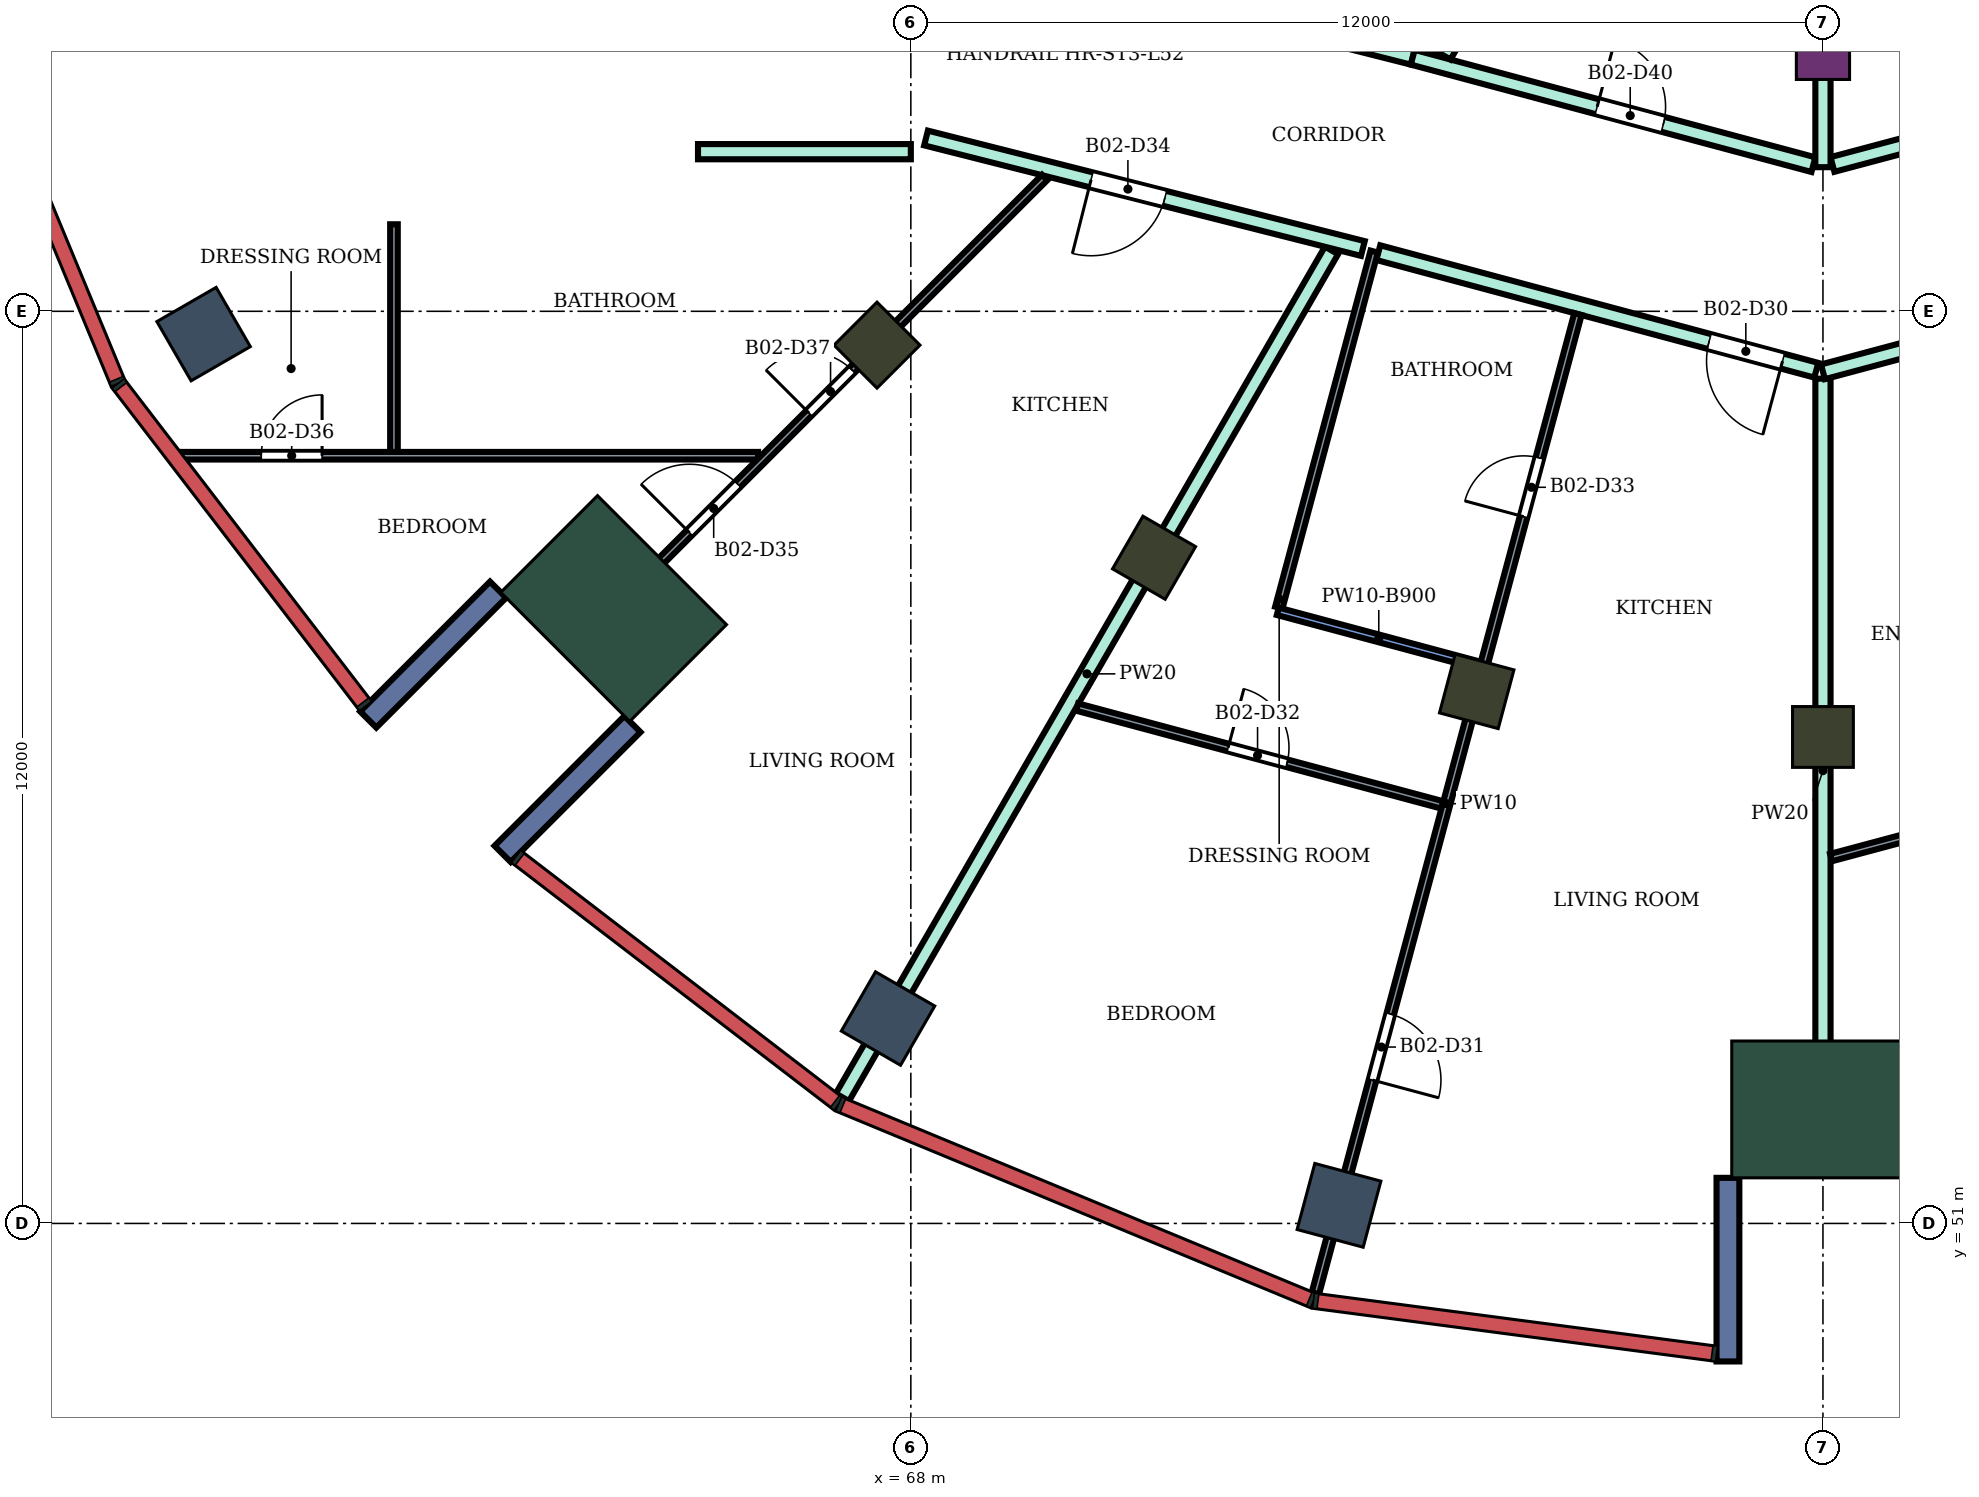
"""IFC4 building model, lengths in metres.
Left out: names, types, materials, properties, quantities, classifications, styles, units other than length and angle.
Written with IfcOpenShell. Run it as: python <this file> out.ifc"""

import sys

from ifc_helpers import new_model, si_unit, direction, frame, frame_2d, origin, origin_2d, place, context, subcontext, project, spatial, rectangle, extrude, element, fill, save


model = new_model("IFC4")
c1 = context("Model", 3, precision=1e-05, world=origin(), true_north=direction((0.0, 1.0)))
c2 = subcontext(c1, "Body", "Model", "MODEL_VIEW")
j1 = project(units=[si_unit("LENGTHUNIT", "METRE"), si_unit("PLANEANGLEUNIT", "RADIAN")], contexts=[c1])
p1 = place(None, origin())
s1 = spatial("IfcSite", under=j1, at=p1, CompositionType="ELEMENT")
p2 = place(p1, origin())
s2 = spatial("IfcBuilding", under=s1, at=p2, CompositionType="ELEMENT")
p3 = place(p2, frame((0.0, 0.0, 225.1)))
s3 = spatial("IfcBuildingStorey", under=s2, at=p3, CompositionType="ELEMENT", Elevation=225.1)
for number, where, z_axis, x_axis in (
    (1, (58.696, 62.7, 0.0), (0.0, 0.0, 1.0), (-0.866, -0.5, 0.0)),
    (2, (67.7, 53.696, 0.0), (0.0, 0.0, 1.0), (-0.5, -0.866, 0.0)),
    (3, (73.633, 51.238, 0.0), (0.0, 0.0, 1.0), (-0.259, -0.966, 0.0)),
):
    element("IfcColumn", number, at=place(p3, frame(where, z_axis=z_axis, x_axis=x_axis)), inside=s3, PredefinedType="COLUMN", context=c2, shape_type="SweptSolid", body=[
        extrude(rectangle(XDim=0.9, YDim=0.9, at=origin_2d()), origin(), (0.0, 0.0, 1.0), 4.2),
    ])
for number, where, z_axis, x_axis in (
    (4, (67.555, 62.555, 0.0), (0.0, 0.0, 1.0), (-0.707, -0.707, 0.0)),
    (5, (71.2, 59.758, 0.0), (0.0, 0.0, 1.0), (-0.5, -0.866, 0.0)),
    (6, (75.445, 58.0, 0.0), (0.0, 0.0, 1.0), (-0.259, -0.966, 0.0)),
    (7, (80.0, 57.4, 0.0), (0.0, 0.0, 1.0), (0.0, -1.0, 0.0)),
):
    element("IfcColumn", number, at=place(p3, frame(where, z_axis=z_axis, x_axis=x_axis)), inside=s3, PredefinedType="COLUMN", context=c2, shape_type="SweptSolid", body=[
        extrude(rectangle(XDim=0.8, YDim=0.8, at=origin_2d()), origin(), (0.0, 0.0, 1.0), 4.2),
    ])
p4 = place(p3, frame((80.0, 66.4, 0.0), z_axis=(0.0, 0.0, 1.0), x_axis=(0.0, -1.0, 0.0)))
e8 = element("IfcColumn", 8, at=p4, inside=s3, PredefinedType="COLUMN", context=c2, shape_type="SweptSolid", body=[
    extrude(rectangle(XDim=0.7, YDim=0.7, at=origin_2d()), origin(), (0.0, 0.0, 1.0), 4.2),
])
for number, where, z_axis, x_axis in (
    (9, (64.09, 59.09, 0.0), (0.0, 0.0, 1.0), (-0.707, -0.707, 0.0)),
    (10, (80.0, 52.5, 0.0), (0.0, 0.0, 1.0), (0.0, -1.0, 0.0)),
):
    element("IfcColumn", number, at=place(p3, frame(where, z_axis=z_axis, x_axis=x_axis)), inside=s3, PredefinedType="COLUMN", context=c2, shape_type="SweptSolid", body=[
        extrude(rectangle(XDim=1.8, YDim=2.4, at=origin_2d()), origin(), (0.0, 0.0, 1.0), 4.2),
    ])
for number, where, z_axis, x_axis in (
    (11, (62.57, 59.338, 0.0), (0.0, 0.0, 1.0), (-0.707, -0.707, 0.0)),
    (12, (64.338, 57.57, 0.0), (0.0, 0.0, 1.0), (-0.707, -0.707, 0.0)),
    (13, (78.75, 51.6, 0.0), (0.0, 0.0, 1.0), (0.0, -1.0, 0.0)),
):
    element("IfcWall", number, at=place(p3, frame(where, z_axis=z_axis, x_axis=x_axis)), inside=s3, PredefinedType="NOTDEFINED", context=c2, shape_type="SweptSolid", body=[
        extrude(rectangle(XDim=2.416, YDim=0.3, at=frame_2d((1.208, 0.0))), origin(), (0.0, 0.0, 1.0), 4.2),
    ])
p5 = place(p3, frame((65.2, 65.1, 0.0), z_axis=(0.0, 0.0, 1.0), x_axis=(1.0, 0.0, 0.0)))
e14 = element("IfcWall", 14, at=p5, inside=s3, PredefinedType="PARTITIONING", context=c2, shape_type="SweptSolid", body=[
    extrude(rectangle(XDim=2.8, YDim=0.2, at=frame_2d((1.4, 0.0))), origin(), (0.0, 0.0, 1.0), 3.75),
])
p6 = place(p3, frame((67.1, 52.659, 0.0), z_axis=(0.0, 0.0, 1.0), x_axis=(0.500128690501, 0.865951091539, 0.0)))
e15 = element("IfcWall", 15, at=p6, inside=s3, PredefinedType="PARTITIONING", context=c2, shape_type="SweptSolid", body=[
    extrude(rectangle(XDim=12.866, YDim=0.2, at=frame_2d((6.433, 0.0))), origin(), (0.0, 0.0, 1.0), 3.75),
])
p7 = place(p3, frame((68.2, 65.28, 0.0), z_axis=(0.0, 0.0, 1.0), x_axis=(0.969450596516, -0.245286650503, 0.0)))
e16 = element("IfcWall", 16, at=p7, inside=s3, PredefinedType="PARTITIONING", context=c2, shape_type="SweptSolid", body=[
    extrude(rectangle(XDim=5.928, YDim=0.2, at=frame_2d((2.964, 0.0))), origin(), (0.0, 0.0, 1.0), 3.75),
])
p8 = place(p7, frame((2.24, 0.0, 0.0)))
e17 = element("IfcOpeningElement", 17, at=p8, cuts=e16, PredefinedType="OPENING", context=c2, shape_type="SweptSolid", body=[
    extrude(rectangle(XDim=1.0, YDim=2.1, at=frame_2d((0.5, 1.05))), frame((0.0, 0.11, 0.0), z_axis=(0.0, -1.0, 0.0), x_axis=(1.0, 0.0, 0.0)), (0.0, 0.0, 1.0), 0.22),
])
p9 = place(p3, frame((72.1, 66.975, 0.0), z_axis=(0.0, 0.0, 1.0), x_axis=(0.969471314457, -0.245204752086, 0.0)))
e18 = element("IfcWall", 18, at=p9, inside=s3, PredefinedType="PARTITIONING", context=c2, shape_type="SweptSolid", body=[
    extrude(rectangle(XDim=2.582, YDim=0.2, at=frame_2d((1.291, 0.0))), origin(), (0.0, 0.0, 1.0), 3.75),
])
p10 = place(p9, frame((0.841, 0.0, 0.0)))
e19 = element("IfcOpeningElement", 19, at=p10, cuts=e18, PredefinedType="OPENING", context=c2, shape_type="SweptSolid", body=[
    extrude(rectangle(XDim=0.9, YDim=2.1, at=frame_2d((0.45, 1.05))), frame((0.0, 0.11, 0.0), z_axis=(0.0, -1.0, 0.0), x_axis=(1.0, 0.0, 0.0)), (0.0, 0.0, 1.0), 0.22),
])
p11 = place(p3, frame((74.15, 63.772, 0.0), z_axis=(0.0, 0.0, 1.0), x_axis=(0.965807109237, -0.259261697417, 0.0)))
e20 = element("IfcWall", 20, at=p11, inside=s3, PredefinedType="PARTITIONING", context=c2, shape_type="SweptSolid", body=[
    extrude(rectangle(XDim=5.967, YDim=0.2, at=frame_2d((2.983, 0.0))), origin(), (0.0, 0.0, 1.0), 3.75),
])
p12 = place(p11, frame((4.507, 0.0, 0.0)))
e21 = element("IfcOpeningElement", 21, at=p12, cuts=e20, PredefinedType="OPENING", context=c2, shape_type="SweptSolid", body=[
    extrude(rectangle(XDim=1.0, YDim=2.1, at=frame_2d((0.5, 1.05))), frame((0.0, 0.11, 0.0), z_axis=(0.0, -1.0, 0.0), x_axis=(1.0, 0.0, 0.0)), (0.0, 0.0, 1.0), 0.22),
])
p13 = place(p3, frame((74.603, 66.342, 0.0), z_axis=(0.0, 0.0, 1.0), x_axis=(0.965920893652, -0.258837453254, 0.0)))
e22 = element("IfcWall", 22, at=p13, inside=s3, PredefinedType="PARTITIONING", context=c2, shape_type="SweptSolid", body=[
    extrude(rectangle(XDim=5.458, YDim=0.2, at=frame_2d((2.729, 0.0))), origin(), (0.0, 0.0, 1.0), 3.75),
])
p14 = place(p13, frame((2.512, 0.0, 0.0)))
e23 = element("IfcOpeningElement", 23, at=p14, cuts=e22, PredefinedType="OPENING", context=c2, shape_type="SweptSolid", body=[
    extrude(rectangle(XDim=0.9, YDim=2.1, at=frame_2d((0.45, 1.05))), frame((0.0, 0.11, 0.0), z_axis=(0.0, -1.0, 0.0), x_axis=(1.0, 0.0, 0.0)), (0.0, 0.0, 1.0), 0.22),
])
p15 = place(p3, frame((75.014, 66.362, 0.0), z_axis=(0.0, 0.0, 1.0), x_axis=(0.500143511652, 0.865942531438, 0.0)))
e24 = element("IfcWall", 24, at=p15, inside=s3, PredefinedType="PARTITIONING", context=c2, shape_type="SweptSolid", body=[
    extrude(rectangle(XDim=2.275, YDim=0.2, at=frame_2d((1.138, 0.0))), origin(), (0.0, 0.0, 1.0), 3.75),
])
p16 = place(p3, frame((80.125, 64.932, 0.0), z_axis=(0.0, 0.0, 1.0), x_axis=(0.966236955806, 0.257655089674, 0.0)))
e25 = element("IfcWall", 25, at=p16, inside=s3, PredefinedType="PARTITIONING", context=c2, shape_type="SweptSolid", body=[
    extrude(rectangle(XDim=8.039, YDim=0.2, at=frame_2d((4.02, 0.0))), origin(), (0.0, 0.0, 1.0), 3.75),
])
p17 = place(p16, frame((6.298, 0.0, 0.0)))
e26 = element("IfcOpeningElement", 26, at=p17, cuts=e25, PredefinedType="OPENING", context=c2, shape_type="SweptSolid", body=[
    extrude(rectangle(XDim=0.9, YDim=2.1, at=frame_2d((0.45, 1.05))), frame((0.0, 0.11, 0.0), z_axis=(0.0, -1.0, 0.0), x_axis=(1.0, 0.0, 0.0)), (0.0, 0.0, 1.0), 0.22),
])
p18 = place(p16, frame((2.045, 0.0, 0.0)))
e27 = element("IfcOpeningElement", 27, at=p18, cuts=e25, PredefinedType="OPENING", context=c2, shape_type="SweptSolid", body=[
    extrude(rectangle(XDim=0.9, YDim=2.1, at=frame_2d((0.45, 1.05))), frame((0.0, 0.11, 0.0), z_axis=(0.0, -1.0, 0.0), x_axis=(1.0, 0.0, 0.0)), (0.0, 0.0, 1.0), 0.22),
])
p19 = place(p3, frame((80.0, 51.8, 0.0), z_axis=(0.0, 0.0, 1.0), x_axis=(0.0, 1.0, 0.0)))
e28 = element("IfcWall", 28, at=p19, inside=s3, PredefinedType="PARTITIONING", context=c2, shape_type="SweptSolid", body=[
    extrude(rectangle(XDim=10.314, YDim=0.2, at=frame_2d((5.157, 0.0))), origin(), (0.0, 0.0, 1.0), 3.75),
])
p20 = place(p3, frame((80.0, 62.204, 0.0), z_axis=(0.0, 0.0, 1.0), x_axis=(0.965938139786, 0.258773086132, 0.0)))
e29 = element("IfcWall", 29, at=p20, inside=s3, PredefinedType="PARTITIONING", context=c2, shape_type="SweptSolid", body=[
    extrude(rectangle(XDim=6.266, YDim=0.2, at=frame_2d((3.133, 0.0))), origin(), (0.0, 0.0, 1.0), 3.75),
])
p21 = place(p3, frame((80.0, 64.896, 0.0), z_axis=(0.0, 0.0, 1.0), x_axis=(0.0, 1.0, 0.0)))
e30 = element("IfcWall", 30, at=p21, inside=s3, PredefinedType="PARTITIONING", context=c2, shape_type="SweptSolid", body=[
    extrude(rectangle(XDim=2.405, YDim=0.2, at=frame_2d((1.203, 0.0))), origin(), (0.0, 0.0, 1.0), 3.75),
])
p22 = place(p3, frame((58.379, 61.1, 0.0), z_axis=(0.0, 0.0, 1.0), x_axis=(1.0, 0.0, 0.0)))
e31 = element("IfcWall", 31, at=p22, inside=s3, PredefinedType="PARTITIONING", context=c2, shape_type="SweptSolid", body=[
    extrude(rectangle(XDim=7.611, YDim=0.1, at=frame_2d((3.806, 0.0))), origin(), (0.0, 0.0, 1.0), 3.75),
])
p23 = place(p22, frame((1.075, 0.0, 0.0)))
e32 = element("IfcOpeningElement", 32, at=p23, cuts=e31, PredefinedType="OPENING", context=c2, shape_type="SweptSolid", body=[
    extrude(rectangle(XDim=0.8, YDim=2.1, at=frame_2d((0.4, 1.05))), frame((0.0, 0.06, 0.0), z_axis=(0.0, -1.0, 0.0), x_axis=(1.0, 0.0, 0.0)), (0.0, 0.0, 1.0), 0.12),
])
p24 = place(p3, frame((61.2, 61.15, 0.0), z_axis=(0.0, 0.0, 1.0), x_axis=(0.0, 1.0, 0.0)))
e33 = element("IfcWall", 33, at=p24, inside=s3, PredefinedType="PARTITIONING", context=c2, shape_type="SweptSolid", body=[
    extrude(rectangle(XDim=2.995, YDim=0.1, at=frame_2d((1.498, 0.0))), origin(), (0.0, 0.0, 1.0), 3.75),
])
p25 = place(p3, frame((63.596, 58.596, 0.0), z_axis=(0.0, 0.0, 1.0), x_axis=(0.707106781187, 0.707106781187, 0.0)))
e34 = element("IfcWall", 34, at=p25, inside=s3, PredefinedType="PARTITIONING", context=c2, shape_type="SweptSolid", body=[
    extrude(rectangle(XDim=8.719, YDim=0.1, at=frame_2d((4.359, 0.0))), origin(), (0.0, 0.0, 1.0), 3.75),
])
p26 = place(p25, frame((2.111, 0.0, 0.0)))
e35 = element("IfcOpeningElement", 35, at=p26, cuts=e34, PredefinedType="OPENING", context=c2, shape_type="SweptSolid", body=[
    extrude(rectangle(XDim=0.9, YDim=2.1, at=frame_2d((0.45, 1.05))), frame((0.0, 0.06, 0.0), z_axis=(0.0, -1.0, 0.0), x_axis=(1.0, 0.0, 0.0)), (0.0, 0.0, 1.0), 0.12),
])
p27 = place(p25, frame((4.335, 0.0, 0.0)))
e36 = element("IfcOpeningElement", 36, at=p27, cuts=e34, PredefinedType="OPENING", context=c2, shape_type="SweptSolid", body=[
    extrude(rectangle(XDim=0.8, YDim=2.1, at=frame_2d((0.4, 1.05))), frame((0.0, 0.06, 0.0), z_axis=(0.0, -1.0, 0.0), x_axis=(1.0, 0.0, 0.0)), (0.0, 0.0, 1.0), 0.12),
])
p28 = place(p3, frame((70.188, 57.793, 0.0), z_axis=(0.0, 0.0, 1.0), x_axis=(0.965913212633, -0.258866115322, 0.0)))
e37 = element("IfcWall", 37, at=p28, inside=s3, PredefinedType="PARTITIONING", context=c2, shape_type="SweptSolid", body=[
    extrude(rectangle(XDim=4.974, YDim=0.1, at=frame_2d((2.487, 0.0))), origin(), (0.0, 0.0, 1.0), 3.75),
])
p29 = place(p28, frame((2.057, 0.0, 0.0)))
e38 = element("IfcOpeningElement", 38, at=p29, cuts=e37, PredefinedType="OPENING", context=c2, shape_type="SweptSolid", body=[
    extrude(rectangle(XDim=0.8, YDim=2.1, at=frame_2d((0.4, 1.05))), frame((0.0, 0.06, 0.0), z_axis=(0.0, -1.0, 0.0), x_axis=(1.0, 0.0, 0.0)), (0.0, 0.0, 1.0), 0.12),
])
p30 = place(p3, frame((72.841, 59.101, 0.0), z_axis=(0.0, 0.0, 1.0), x_axis=(0.258799830155, 0.965930974714, 0.0)))
e39 = element("IfcWall", 39, at=p30, inside=s3, PredefinedType="PARTITIONING", context=c2, shape_type="SweptSolid", body=[
    extrude(rectangle(XDim=4.85, YDim=0.1, at=frame_2d((2.425, 0.0))), origin(), (0.0, 0.0, 1.0), 3.75),
])
p31 = place(p3, frame((72.828, 59.053, 0.0), z_axis=(0.0, 0.0, 1.0), x_axis=(0.965899705866, -0.25891650818, 0.0)))
e40 = element("IfcWall", 40, at=p31, inside=s3, PredefinedType="PARTITIONING", context=c2, shape_type="SweptSolid", body=[
    extrude(rectangle(XDim=2.75, YDim=0.1, at=frame_2d((1.375, 0.0))), origin(), (0.0, 0.0, 1.0), 3.3),
])
p32 = place(p3, frame((73.323, 50.081, 0.0), z_axis=(0.0, 0.0, 1.0), x_axis=(0.258961147073, 0.965887738977, 0.0)))
e41 = element("IfcWall", 41, at=p32, inside=s3, PredefinedType="PARTITIONING", context=c2, shape_type="SweptSolid", body=[
    extrude(rectangle(XDim=13.338, YDim=0.1, at=frame_2d((6.669, 0.0))), origin(), (0.0, 0.0, 1.0), 3.75),
])
p33 = place(p32, frame((2.904, 0.0, 0.0)))
e42 = element("IfcOpeningElement", 42, at=p33, cuts=e41, PredefinedType="OPENING", context=c2, shape_type="SweptSolid", body=[
    extrude(rectangle(XDim=0.9, YDim=2.1, at=frame_2d((0.45, 1.05))), frame((0.0, 0.06, 0.0), z_axis=(0.0, -1.0, 0.0), x_axis=(1.0, 0.0, 0.0)), (0.0, 0.0, 1.0), 0.12),
])
p34 = place(p32, frame((10.578, 0.0, 0.0)))
e43 = element("IfcOpeningElement", 43, at=p34, cuts=e41, PredefinedType="OPENING", context=c2, shape_type="SweptSolid", body=[
    extrude(rectangle(XDim=0.8, YDim=2.1, at=frame_2d((0.4, 1.05))), frame((0.0, 0.06, 0.0), z_axis=(0.0, -1.0, 0.0), x_axis=(1.0, 0.0, 0.0)), (0.0, 0.0, 1.0), 0.12),
])
p35 = place(p3, frame((80.106, 55.813, 0.0), z_axis=(0.0, 0.0, 1.0), x_axis=(0.965936279421, 0.25878003033, 0.0)))
e44 = element("IfcWall", 44, at=p35, inside=s3, PredefinedType="PARTITIONING", context=c2, shape_type="SweptSolid", body=[
    extrude(rectangle(XDim=4.813, YDim=0.1, at=frame_2d((2.407, 0.0))), origin(), (0.0, 0.0, 1.0), 3.75),
])
p36 = place(p35, frame((1.977, 0.0, 0.0)))
e45 = element("IfcOpeningElement", 45, at=p36, cuts=e44, PredefinedType="OPENING", context=c2, shape_type="SweptSolid", body=[
    extrude(rectangle(XDim=0.8, YDim=2.1, at=frame_2d((0.4, 1.05))), frame((0.0, 0.06, 0.0), z_axis=(0.0, -1.0, 0.0), x_axis=(1.0, 0.0, 0.0)), (0.0, 0.0, 1.0), 0.12),
])
p37 = place(p12, frame((1.0, 0.0, 0.0), z_axis=(0.0, 0.0, 1.0), x_axis=(-1.0, 0.0, 0.0)))
e46 = element("IfcDoor", 46, at=p37, inside=s3, OperationType="SINGLE_SWING_LEFT", PredefinedType="DOOR", context=c2, shape_type="SweptSolid", body=[
    extrude(rectangle(XDim=1.0, YDim=2.1, at=frame_2d((0.5, 1.05))), frame((0.0, 0.025, 0.0), z_axis=(0.0, -1.0, 0.0), x_axis=(1.0, 0.0, 0.0)), (0.0, 0.0, 1.0), 0.05),
])
fill(e21, e46)
p38 = place(p33, frame((0.9, 0.0, 0.0), z_axis=(0.0, 0.0, 1.0), x_axis=(-1.0, 0.0, 0.0)))
e47 = element("IfcDoor", 47, at=p38, inside=s3, OperationType="SINGLE_SWING_RIGHT", PredefinedType="DOOR", context=c2, shape_type="SweptSolid", body=[
    extrude(rectangle(XDim=0.9, YDim=2.1, at=frame_2d((0.45, 1.05))), frame((0.0, 0.025, 0.0), z_axis=(0.0, -1.0, 0.0), x_axis=(1.0, 0.0, 0.0)), (0.0, 0.0, 1.0), 0.05),
])
fill(e42, e47)
p39 = place(p29, origin())
e48 = element("IfcDoor", 48, at=p39, inside=s3, OperationType="SINGLE_SWING_LEFT", PredefinedType="DOOR", context=c2, shape_type="SweptSolid", body=[
    extrude(rectangle(XDim=0.8, YDim=2.1, at=frame_2d((0.4, 1.05))), frame((0.0, 0.025, 0.0), z_axis=(0.0, -1.0, 0.0), x_axis=(1.0, 0.0, 0.0)), (0.0, 0.0, 1.0), 0.05),
])
fill(e38, e48)
p40 = place(p34, origin())
e49 = element("IfcDoor", 49, at=p40, inside=s3, OperationType="SINGLE_SWING_LEFT", PredefinedType="DOOR", context=c2, shape_type="SweptSolid", body=[
    extrude(rectangle(XDim=0.8, YDim=2.1, at=frame_2d((0.4, 1.05))), frame((0.0, 0.025, 0.0), z_axis=(0.0, -1.0, 0.0), x_axis=(1.0, 0.0, 0.0)), (0.0, 0.0, 1.0), 0.05),
])
fill(e43, e49)
p41 = place(p8, frame((1.0, 0.0, 0.0), z_axis=(0.0, 0.0, 1.0), x_axis=(-1.0, 0.0, 0.0)))
e50 = element("IfcDoor", 50, at=p41, inside=s3, OperationType="SINGLE_SWING_RIGHT", PredefinedType="DOOR", context=c2, shape_type="SweptSolid", body=[
    extrude(rectangle(XDim=1.0, YDim=2.1, at=frame_2d((0.5, 1.05))), frame((0.0, 0.025, 0.0), z_axis=(0.0, -1.0, 0.0), x_axis=(1.0, 0.0, 0.0)), (0.0, 0.0, 1.0), 0.05),
])
fill(e17, e50)
p42 = place(p26, origin())
e51 = element("IfcDoor", 51, at=p42, inside=s3, OperationType="SINGLE_SWING_LEFT", PredefinedType="DOOR", context=c2, shape_type="SweptSolid", body=[
    extrude(rectangle(XDim=0.9, YDim=2.1, at=frame_2d((0.45, 1.05))), frame((0.0, 0.025, 0.0), z_axis=(0.0, -1.0, 0.0), x_axis=(1.0, 0.0, 0.0)), (0.0, 0.0, 1.0), 0.05),
])
fill(e35, e51)
p43 = place(p23, origin())
e52 = element("IfcDoor", 52, at=p43, inside=s3, OperationType="SINGLE_SWING_RIGHT", PredefinedType="DOOR", context=c2, shape_type="SweptSolid", body=[
    extrude(rectangle(XDim=0.8, YDim=2.1, at=frame_2d((0.4, 1.05))), frame((0.0, 0.025, 0.0), z_axis=(0.0, -1.0, 0.0), x_axis=(1.0, 0.0, 0.0)), (0.0, 0.0, 1.0), 0.05),
])
fill(e32, e52)
p44 = place(p27, origin())
e53 = element("IfcDoor", 53, at=p44, inside=s3, OperationType="SINGLE_SWING_LEFT", PredefinedType="DOOR", context=c2, shape_type="SweptSolid", body=[
    extrude(rectangle(XDim=0.8, YDim=2.1, at=frame_2d((0.4, 1.05))), frame((0.0, 0.025, 0.0), z_axis=(0.0, -1.0, 0.0), x_axis=(1.0, 0.0, 0.0)), (0.0, 0.0, 1.0), 0.05),
])
fill(e36, e53)
p45 = place(p14, origin())
e54 = element("IfcDoor", 54, at=p45, inside=s3, OperationType="SINGLE_SWING_LEFT", PredefinedType="DOOR", context=c2, shape_type="SweptSolid", body=[
    extrude(rectangle(XDim=0.9, YDim=2.1, at=frame_2d((0.45, 1.05))), frame((0.0, 0.025, 0.0), z_axis=(0.0, -1.0, 0.0), x_axis=(1.0, 0.0, 0.0)), (0.0, 0.0, 1.0), 0.05),
])
fill(e23, e54)
save(model, sys.argv[1])
